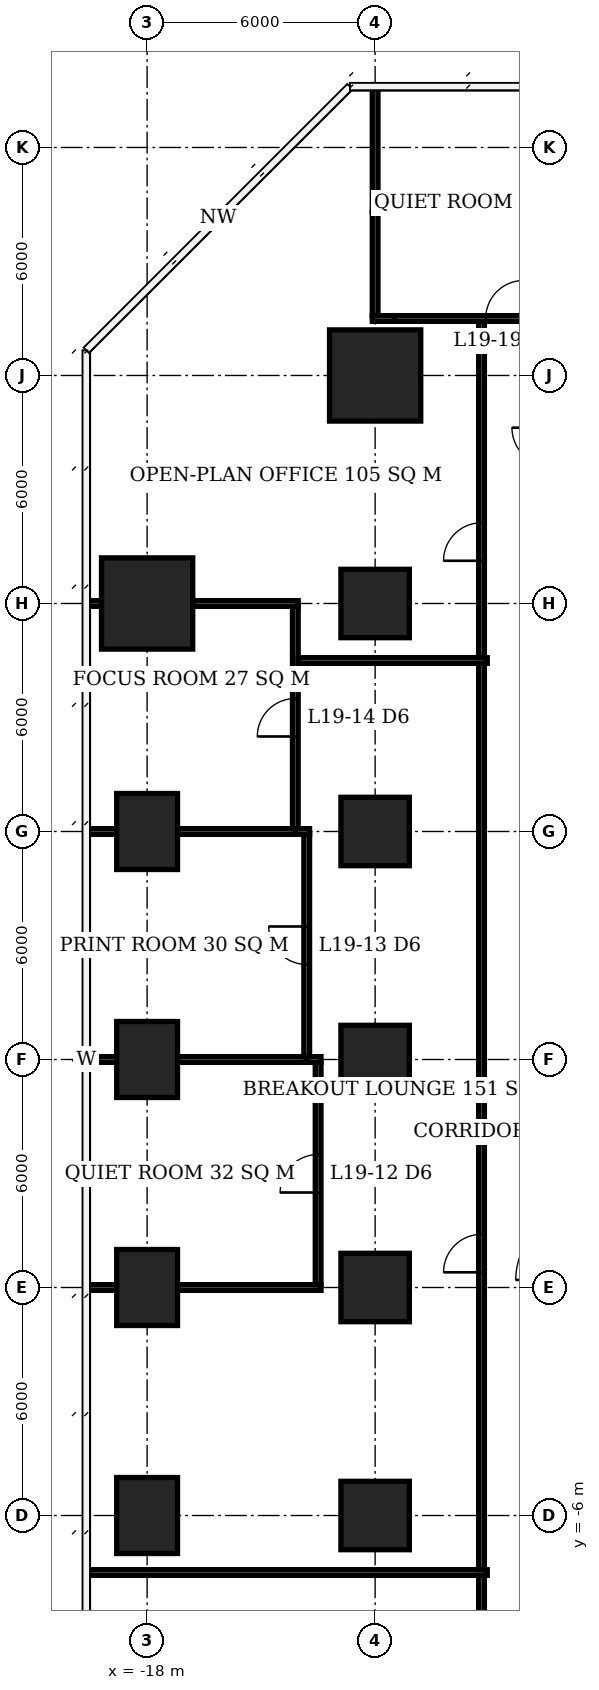
"""IFC4 building model, lengths in metres.
Left out: names, types, materials, properties, quantities, classifications, styles, units other than length and angle.
Written with IfcOpenShell. Run it as: python <this file> out.ifc"""

import sys

from ifc_helpers import new_model, si_unit, direction, frame, frame_2d, origin, origin_2d, place, context, subcontext, project, spatial, rectangle, extrude, element, fill, save


model = new_model("IFC4")
c1 = context("Model", 3, precision=1e-05, world=origin(), true_north=direction((0.0, 1.0)))
c2 = subcontext(c1, "Body", "Model", "MODEL_VIEW")
j1 = project(units=[si_unit("LENGTHUNIT", "METRE"), si_unit("PLANEANGLEUNIT", "RADIAN")], contexts=[c1])
p1 = place(None, origin())
s1 = spatial("IfcSite", under=j1, at=p1, CompositionType="ELEMENT")
p2 = place(p1, origin())
s2 = spatial("IfcBuilding", under=s1, at=p2, CompositionType="ELEMENT")
p3 = place(p2, frame((0.0, 0.0, 80.6)))
s3 = spatial("IfcBuildingStorey", under=s2, at=p3, CompositionType="ELEMENT", Elevation=80.6)
for number, where, z_axis, x_axis in (
    (1, (-18.0, -6.0, 0.0), (0.0, 0.0, 1.0), (0.0, 1.0, 0.0)),
    (2, (-18.0, 0.0, 0.0), (0.0, 0.0, 1.0), (0.0, 1.0, 0.0)),
    (3, (-18.0, 6.0, 0.0), (0.0, 0.0, 1.0), (0.0, 1.0, 0.0)),
    (4, (-18.0, 12.0, 0.0), (0.0, 0.0, 1.0), (0.0, 1.0, 0.0)),
):
    element("IfcColumn", number, at=place(p3, frame(where, z_axis=z_axis, x_axis=x_axis)), inside=s3, PredefinedType="COLUMN", context=c2, shape_type="SweptSolid", body=[
        extrude(rectangle(XDim=2.0, YDim=1.6, at=origin_2d()), origin(), (0.0, 0.0, 1.0), 3.9),
    ])
p4 = place(p3, frame((-18.0, 18.0, 0.0), z_axis=(0.0, 0.0, 1.0), x_axis=(1.0, 0.0, 0.0)))
e5 = element("IfcColumn", 5, at=p4, inside=s3, PredefinedType="COLUMN", context=c2, shape_type="SweptSolid", body=[
    extrude(rectangle(XDim=2.4, YDim=2.4, at=origin_2d()), origin(), (0.0, 0.0, 1.0), 3.9),
])
for number, where, z_axis, x_axis in (
    (6, (-12.0, -6.0, 0.0), (0.0, 0.0, 1.0), (1.0, 0.0, 0.0)),
    (7, (-12.0, 0.0, 0.0), (0.0, 0.0, 1.0), (1.0, 0.0, 0.0)),
    (8, (-12.0, 6.0, 0.0), (0.0, 0.0, 1.0), (1.0, 0.0, 0.0)),
    (9, (-12.0, 12.0, 0.0), (0.0, 0.0, 1.0), (1.0, 0.0, 0.0)),
    (10, (-12.0, 18.0, 0.0), (0.0, 0.0, 1.0), (1.0, 0.0, 0.0)),
):
    element("IfcColumn", number, at=place(p3, frame(where, z_axis=z_axis, x_axis=x_axis)), inside=s3, PredefinedType="COLUMN", context=c2, shape_type="SweptSolid", body=[
        extrude(rectangle(XDim=1.8, YDim=1.8, at=origin_2d()), origin(), (0.0, 0.0, 1.0), 3.9),
    ])
p5 = place(p3, frame((-12.0, 24.0, 0.0), z_axis=(0.0, 0.0, 1.0), x_axis=(1.0, 0.0, 0.0)))
e11 = element("IfcColumn", 11, at=p5, inside=s3, PredefinedType="COLUMN", context=c2, shape_type="SweptSolid", body=[
    extrude(rectangle(XDim=2.4, YDim=2.4, at=origin_2d()), origin(), (0.0, 0.0, 1.0), 3.9),
])
p6 = place(p3, frame((-19.6, 0.0, 0.0), z_axis=(0.0, 0.0, 1.0), x_axis=(1.0, 0.0, 0.0)))
e12 = element("IfcWall", 12, at=p6, inside=s3, PredefinedType="PARTITIONING", context=c2, shape_type="SweptSolid", body=[
    extrude(rectangle(XDim=0.8, YDim=0.15, at=frame_2d((0.4, 0.0))), origin(), (0.0, 0.0, 1.0), 3.65),
])
p7 = place(p3, frame((-17.2, 0.0, 0.0), z_axis=(0.0, 0.0, 1.0), x_axis=(1.0, 0.0, 0.0)))
e13 = element("IfcWall", 13, at=p7, inside=s3, PredefinedType="PARTITIONING", context=c2, shape_type="SweptSolid", body=[
    extrude(rectangle(XDim=3.775, YDim=0.15, at=frame_2d((1.887, 0.0))), origin(), (0.0, 0.0, 1.0), 3.65),
])
p8 = place(p3, frame((-19.55, 6.0, 0.0), z_axis=(0.0, 0.0, 1.0), x_axis=(1.0, 0.0, 0.0)))
e14 = element("IfcWall", 14, at=p8, inside=s3, PredefinedType="PARTITIONING", context=c2, shape_type="SweptSolid", body=[
    extrude(rectangle(XDim=0.75, YDim=0.15, at=frame_2d((0.375, 0.0))), origin(), (0.0, 0.0, 1.0), 3.65),
])
p9 = place(p3, frame((-17.2, 6.0, 0.0), z_axis=(0.0, 0.0, 1.0), x_axis=(1.0, 0.0, 0.0)))
e15 = element("IfcWall", 15, at=p9, inside=s3, PredefinedType="PARTITIONING", context=c2, shape_type="SweptSolid", body=[
    extrude(rectangle(XDim=3.475, YDim=0.15, at=frame_2d((1.737, 0.0))), origin(), (0.0, 0.0, 1.0), 3.65),
])
p10 = place(p3, frame((-13.8, 6.0, 0.0), z_axis=(0.0, 0.0, 1.0), x_axis=(1.0, 0.0, 0.0)))
e16 = element("IfcWall", 16, at=p10, inside=s3, PredefinedType="PARTITIONING", context=c2, shape_type="SweptSolid", body=[
    extrude(rectangle(XDim=0.375, YDim=0.15, at=frame_2d((0.188, 0.0))), origin(), (0.0, 0.0, 1.0), 3.65),
])
p11 = place(p3, frame((-19.6, 12.0, 0.0), z_axis=(0.0, 0.0, 1.0), x_axis=(1.0, 0.0, 0.0)))
e17 = element("IfcWall", 17, at=p11, inside=s3, PredefinedType="PARTITIONING", context=c2, shape_type="SweptSolid", body=[
    extrude(rectangle(XDim=0.8, YDim=0.15, at=frame_2d((0.4, 0.0))), origin(), (0.0, 0.0, 1.0), 3.65),
])
p12 = place(p3, frame((-17.2, 12.0, 0.0), z_axis=(0.0, 0.0, 1.0), x_axis=(1.0, 0.0, 0.0)))
e18 = element("IfcWall", 18, at=p12, inside=s3, PredefinedType="PARTITIONING", context=c2, shape_type="SweptSolid", body=[
    extrude(rectangle(XDim=3.175, YDim=0.15, at=frame_2d((1.587, 0.0))), origin(), (0.0, 0.0, 1.0), 3.65),
])
p13 = place(p3, frame((-14.1, 12.0, 0.0), z_axis=(0.0, 0.0, 1.0), x_axis=(1.0, 0.0, 0.0)))
e19 = element("IfcWall", 19, at=p13, inside=s3, PredefinedType="PARTITIONING", context=c2, shape_type="SweptSolid", body=[
    extrude(rectangle(XDim=0.375, YDim=0.15, at=frame_2d((0.188, 0.0))), origin(), (0.0, 0.0, 1.0), 3.65),
])
p14 = place(p3, frame((-19.6, 18.0, 0.0), z_axis=(0.0, 0.0, 1.0), x_axis=(1.0, 0.0, 0.0)))
e20 = element("IfcWall", 20, at=p14, inside=s3, PredefinedType="PARTITIONING", context=c2, shape_type="SweptSolid", body=[
    extrude(rectangle(XDim=0.4, YDim=0.15, at=frame_2d((0.2, 0.0))), origin(), (0.0, 0.0, 1.0), 3.65),
])
p15 = place(p3, frame((-16.8, 18.0, 0.0), z_axis=(0.0, 0.0, 1.0), x_axis=(1.0, 0.0, 0.0)))
e21 = element("IfcWall", 21, at=p15, inside=s3, PredefinedType="PARTITIONING", context=c2, shape_type="SweptSolid", body=[
    extrude(rectangle(XDim=2.775, YDim=0.15, at=frame_2d((1.388, 0.0))), origin(), (0.0, 0.0, 1.0), 3.65),
])
p16 = place(p3, frame((-12.075, 25.5, 0.0), z_axis=(0.0, 0.0, 1.0), x_axis=(1.0, 0.0, 0.0)))
e22 = element("IfcWall", 22, at=p16, inside=s3, PredefinedType="PARTITIONING", context=c2, shape_type="SweptSolid", body=[
    extrude(rectangle(XDim=0.585, YDim=0.15, at=frame_2d((0.292, 0.0))), origin(), (0.0, 0.0, 1.0), 2.65),
])
p17 = place(p3, frame((-11.49, 25.5, 0.0), z_axis=(0.0, 0.0, 1.0), x_axis=(1.0, 0.0, 0.0)))
e23 = element("IfcWall", 23, at=p17, inside=s3, PredefinedType="PARTITIONING", context=c2, shape_type="SweptSolid", body=[
    extrude(rectangle(XDim=4.78, YDim=0.15, at=frame_2d((2.39, 0.0))), origin(), (0.0, 0.0, 1.0), 3.65),
])
p18 = place(p17, frame((2.4, 0.0, 0.0)))
e24 = element("IfcOpeningElement", 24, at=p18, cuts=e23, PredefinedType="OPENING", context=c2, shape_type="SweptSolid", body=[
    extrude(rectangle(XDim=1.0, YDim=2.1, at=frame_2d((0.5, 1.05))), frame((0.0, 0.085, 0.0), z_axis=(0.0, -1.0, 0.0), x_axis=(1.0, 0.0, 0.0)), (0.0, 0.0, 1.0), 0.17),
])
p19 = place(p3, frame((-14.1, 12.075, 0.0), z_axis=(0.0, 0.0, 1.0), x_axis=(0.0, 1.0, 0.0)))
e25 = element("IfcWall", 25, at=p19, inside=s3, PredefinedType="PARTITIONING", context=c2, shape_type="SweptSolid", body=[
    extrude(rectangle(XDim=5.85, YDim=0.15, at=frame_2d((2.925, 0.0))), origin(), (0.0, 0.0, 1.0), 3.65),
])
p20 = place(p19, frame((2.425, 0.0, 0.0)))
e26 = element("IfcOpeningElement", 26, at=p20, cuts=e25, PredefinedType="OPENING", context=c2, shape_type="SweptSolid", body=[
    extrude(rectangle(XDim=1.0, YDim=2.1, at=frame_2d((0.5, 1.05))), frame((0.0, 0.085, 0.0), z_axis=(0.0, -1.0, 0.0), x_axis=(1.0, 0.0, 0.0)), (0.0, 0.0, 1.0), 0.17),
])
p21 = place(p3, frame((-13.8, 6.075, 0.0), z_axis=(0.0, 0.0, 1.0), x_axis=(0.0, 1.0, 0.0)))
e27 = element("IfcWall", 27, at=p21, inside=s3, PredefinedType="PARTITIONING", context=c2, shape_type="SweptSolid", body=[
    extrude(rectangle(XDim=5.85, YDim=0.15, at=frame_2d((2.925, 0.0))), origin(), (0.0, 0.0, 1.0), 3.65),
])
p22 = place(p21, frame((2.425, 0.0, 0.0)))
e28 = element("IfcOpeningElement", 28, at=p22, cuts=e27, PredefinedType="OPENING", context=c2, shape_type="SweptSolid", body=[
    extrude(rectangle(XDim=1.0, YDim=2.1, at=frame_2d((0.5, 1.05))), frame((0.0, 0.085, 0.0), z_axis=(0.0, -1.0, 0.0), x_axis=(1.0, 0.0, 0.0)), (0.0, 0.0, 1.0), 0.17),
])
p23 = place(p3, frame((-13.5, 0.075, 0.0), z_axis=(0.0, 0.0, 1.0), x_axis=(0.0, 1.0, 0.0)))
e29 = element("IfcWall", 29, at=p23, inside=s3, PredefinedType="PARTITIONING", context=c2, shape_type="SweptSolid", body=[
    extrude(rectangle(XDim=5.85, YDim=0.15, at=frame_2d((2.925, 0.0))), origin(), (0.0, 0.0, 1.0), 3.65),
])
p24 = place(p23, frame((2.425, 0.0, 0.0)))
e30 = element("IfcOpeningElement", 30, at=p24, cuts=e29, PredefinedType="OPENING", context=c2, shape_type="SweptSolid", body=[
    extrude(rectangle(XDim=1.0, YDim=2.1, at=frame_2d((0.5, 1.05))), frame((0.0, 0.085, 0.0), z_axis=(0.0, -1.0, 0.0), x_axis=(1.0, 0.0, 0.0)), (0.0, 0.0, 1.0), 0.17),
])
p25 = place(p3, frame((-12.0, 25.575, 0.0), z_axis=(0.0, 0.0, 1.0), x_axis=(0.0, 1.0, 0.0)))
e31 = element("IfcWall", 31, at=p25, inside=s3, PredefinedType="PARTITIONING", context=c2, shape_type="SweptSolid", body=[
    extrude(rectangle(XDim=2.735, YDim=0.15, at=frame_2d((1.368, 0.0))), origin(), (0.0, 0.0, 1.0), 2.65),
])
p26 = place(p3, frame((-12.0, 28.31, 0.0), z_axis=(0.0, 0.0, 1.0), x_axis=(0.0, 1.0, 0.0)))
e32 = element("IfcWall", 32, at=p26, inside=s3, PredefinedType="PARTITIONING", context=c2, shape_type="SweptSolid", body=[
    extrude(rectangle(XDim=3.29, YDim=0.15, at=frame_2d((1.645, 0.0))), origin(), (0.0, 0.0, 1.0), 3.65),
])
p27 = place(p3, frame((-19.6, -7.5, 0.0), z_axis=(0.0, 0.0, 1.0), x_axis=(1.0, 0.0, 0.0)))
e33 = element("IfcWall", 33, at=p27, inside=s3, PredefinedType="PARTITIONING", context=c2, shape_type="SweptSolid", body=[
    extrude(rectangle(XDim=10.55, YDim=0.15, at=frame_2d((5.275, 0.0))), origin(), (0.0, 0.0, 1.0), 3.65),
])
p28 = place(p3, frame((-14.025, 16.5, 0.0), z_axis=(0.0, 0.0, 1.0), x_axis=(1.0, 0.0, 0.0)))
e34 = element("IfcWall", 34, at=p28, inside=s3, PredefinedType="PARTITIONING", context=c2, shape_type="SweptSolid", body=[
    extrude(rectangle(XDim=4.975, YDim=0.15, at=frame_2d((2.487, 0.0))), origin(), (0.0, 0.0, 1.0), 3.65),
])
p29 = place(p3, frame((-9.2, -13.425, 0.0), z_axis=(0.0, 0.0, 1.0), x_axis=(0.0, 1.0, 0.0)))
e35 = element("IfcWall", 35, at=p29, inside=s3, PredefinedType="PARTITIONING", context=c2, shape_type="SweptSolid", body=[
    extrude(rectangle(XDim=5.85, YDim=0.15, at=frame_2d((2.925, 0.0))), origin(), (0.0, 0.0, 1.0), 3.65),
])
p30 = place(p29, frame((1.574, 0.0, 0.0)))
e36 = element("IfcOpeningElement", 36, at=p30, cuts=e35, PredefinedType="OPENING", context=c2, shape_type="SweptSolid", body=[
    extrude(rectangle(XDim=1.0, YDim=2.1, at=frame_2d((0.5, 1.05))), frame((0.0, 0.085, 0.0), z_axis=(0.0, -1.0, 0.0), x_axis=(1.0, 0.0, 0.0)), (0.0, 0.0, 1.0), 0.17),
])
p31 = place(p3, frame((-9.2, -7.425, 0.0), z_axis=(0.0, 0.0, 1.0), x_axis=(0.0, 1.0, 0.0)))
e37 = element("IfcWall", 37, at=p31, inside=s3, PredefinedType="PARTITIONING", context=c2, shape_type="SweptSolid", body=[
    extrude(rectangle(XDim=23.85, YDim=0.15, at=frame_2d((11.925, 0.0))), origin(), (0.0, 0.0, 1.0), 3.65),
])
p32 = place(p31, frame((7.825, 0.0, 0.0)))
e38 = element("IfcOpeningElement", 38, at=p32, cuts=e37, PredefinedType="OPENING", context=c2, shape_type="SweptSolid", body=[
    extrude(rectangle(XDim=1.0, YDim=2.1, at=frame_2d((0.5, 1.05))), frame((0.0, 0.085, 0.0), z_axis=(0.0, -1.0, 0.0), x_axis=(1.0, 0.0, 0.0)), (0.0, 0.0, 1.0), 0.17),
])
p33 = place(p3, frame((-9.2, 16.575, 0.0), z_axis=(0.0, 0.0, 1.0), x_axis=(0.0, 1.0, 0.0)))
e39 = element("IfcWall", 39, at=p33, inside=s3, PredefinedType="PARTITIONING", context=c2, shape_type="SweptSolid", body=[
    extrude(rectangle(XDim=8.85, YDim=0.15, at=frame_2d((4.425, 0.0))), origin(), (0.0, 0.0, 1.0), 3.65),
])
p34 = place(p33, frame((2.549, 0.0, 0.0)))
e40 = element("IfcOpeningElement", 40, at=p34, cuts=e39, PredefinedType="OPENING", context=c2, shape_type="SweptSolid", body=[
    extrude(rectangle(XDim=1.0, YDim=2.1, at=frame_2d((0.5, 1.05))), frame((0.0, 0.085, 0.0), z_axis=(0.0, -1.0, 0.0), x_axis=(1.0, 0.0, 0.0)), (0.0, 0.0, 1.0), 0.17),
])
p35 = place(p24, origin())
e41 = element("IfcDoor", 41, at=p35, inside=s3, OperationType="SINGLE_SWING_LEFT", PredefinedType="DOOR", context=c2, shape_type="SweptSolid", body=[
    extrude(rectangle(XDim=1.0, YDim=2.1, at=frame_2d((0.5, 1.05))), frame((0.0, 0.025, 0.0), z_axis=(0.0, -1.0, 0.0), x_axis=(1.0, 0.0, 0.0)), (0.0, 0.0, 1.0), 0.05),
])
fill(e30, e41)
p36 = place(p22, origin())
e42 = element("IfcDoor", 42, at=p36, inside=s3, OperationType="SINGLE_SWING_RIGHT", PredefinedType="DOOR", context=c2, shape_type="SweptSolid", body=[
    extrude(rectangle(XDim=1.0, YDim=2.1, at=frame_2d((0.5, 1.05))), frame((0.0, 0.025, 0.0), z_axis=(0.0, -1.0, 0.0), x_axis=(1.0, 0.0, 0.0)), (0.0, 0.0, 1.0), 0.05),
])
fill(e28, e42)
p37 = place(p20, origin())
e43 = element("IfcDoor", 43, at=p37, inside=s3, OperationType="SINGLE_SWING_LEFT", PredefinedType="DOOR", context=c2, shape_type="SweptSolid", body=[
    extrude(rectangle(XDim=1.0, YDim=2.1, at=frame_2d((0.5, 1.05))), frame((0.0, 0.025, 0.0), z_axis=(0.0, -1.0, 0.0), x_axis=(1.0, 0.0, 0.0)), (0.0, 0.0, 1.0), 0.05),
])
fill(e26, e43)
p38 = place(p18, origin())
e44 = element("IfcDoor", 44, at=p38, inside=s3, OperationType="SINGLE_SWING_RIGHT", PredefinedType="DOOR", context=c2, shape_type="SweptSolid", body=[
    extrude(rectangle(XDim=1.0, YDim=2.1, at=frame_2d((0.5, 1.05))), frame((0.0, 0.025, 0.0), z_axis=(0.0, -1.0, 0.0), x_axis=(1.0, 0.0, 0.0)), (0.0, 0.0, 1.0), 0.05),
])
fill(e24, e44)
p39 = place(p32, origin())
e45 = element("IfcDoor", 45, at=p39, inside=s3, OperationType="SINGLE_SWING_LEFT", PredefinedType="DOOR", context=c2, shape_type="SweptSolid", body=[
    extrude(rectangle(XDim=1.0, YDim=2.1, at=frame_2d((0.5, 1.05))), frame((0.0, 0.025, 0.0), z_axis=(0.0, -1.0, 0.0), x_axis=(1.0, 0.0, 0.0)), (0.0, 0.0, 1.0), 0.05),
])
fill(e38, e45)
p40 = place(p34, origin())
e46 = element("IfcDoor", 46, at=p40, inside=s3, OperationType="SINGLE_SWING_LEFT", PredefinedType="DOOR", context=c2, shape_type="SweptSolid", body=[
    extrude(rectangle(XDim=1.0, YDim=2.1, at=frame_2d((0.5, 1.05))), frame((0.0, 0.025, 0.0), z_axis=(0.0, -1.0, 0.0), x_axis=(1.0, 0.0, 0.0)), (0.0, 0.0, 1.0), 0.05),
])
fill(e40, e46)
save(model, sys.argv[1])
